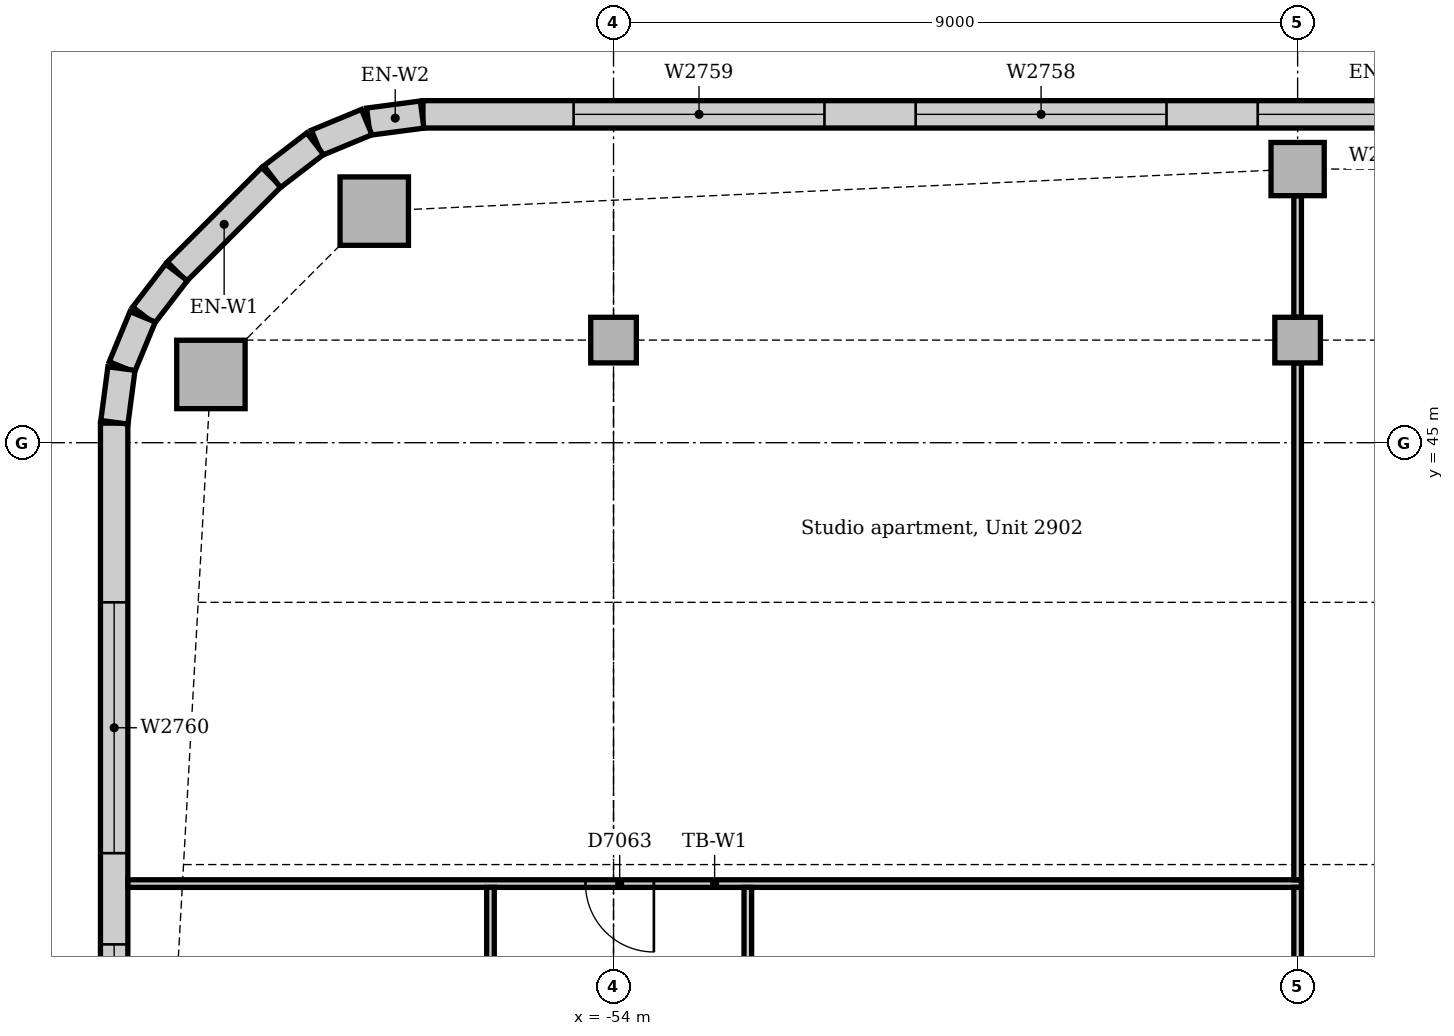
"""IFC4 building model, lengths in metres.
Left out: names, types, materials, properties, quantities, classifications, styles, units other than length and angle.
Written with IfcOpenShell. Run it as: python <this file> out.ifc"""

import sys

from ifc_helpers import new_model, si_unit, direction, frame, frame_2d, origin, origin_2d, place, context, subcontext, project, spatial, rectangle, extrude, element, fill, save


model = new_model("IFC4")
c1 = context("Model", 3, precision=1e-05, world=origin(), true_north=direction((0.0, 1.0)))
c2 = subcontext(c1, "Body", "Model", "MODEL_VIEW")
j1 = project(units=[si_unit("LENGTHUNIT", "METRE"), si_unit("PLANEANGLEUNIT", "RADIAN")], contexts=[c1])
p1 = place(None, origin())
s1 = spatial("IfcSite", under=j1, at=p1, CompositionType="ELEMENT")
p2 = place(p1, origin())
s2 = spatial("IfcBuilding", under=s1, at=p2, CompositionType="ELEMENT")
p3 = place(p2, frame((0.0, 0.0, 124.0)))
s3 = spatial("IfcBuildingStorey", under=s2, at=p3, CompositionType="ELEMENT", Elevation=124.0)
for number, where, z_axis, x_axis in (
    (1, (-57.148, 48.047, 0.0), (0.0, 0.0, 1.0), (1.0, 0.0, 0.0)),
    (2, (-59.297, 45.898, 0.0), (0.0, 0.0, 1.0), (1.0, 0.0, 0.0)),
):
    element("IfcColumn", number, at=place(p3, frame(where, z_axis=z_axis, x_axis=x_axis)), inside=s3, PredefinedType="COLUMN", context=c2, shape_type="SweptSolid", body=[
        extrude(rectangle(XDim=0.9, YDim=0.9, at=origin_2d()), origin(), (0.0, 0.0, 1.0), 3.85),
    ])
p4 = place(p3, frame((-45.0, 48.6, 0.0), z_axis=(0.0, 0.0, 1.0), x_axis=(1.0, 0.0, 0.0)))
e3 = element("IfcColumn", 3, at=p4, inside=s3, PredefinedType="COLUMN", context=c2, shape_type="SweptSolid", body=[
    extrude(rectangle(XDim=0.7, YDim=0.7, at=origin_2d()), origin(), (0.0, 0.0, 1.0), 3.85),
])
for number, where, z_axis, x_axis in (
    (4, (-54.0, 46.35, 0.0), (0.0, 0.0, 1.0), (1.0, 0.0, 0.0)),
    (5, (-45.0, 46.35, 0.0), (0.0, 0.0, 1.0), (1.0, 0.0, 0.0)),
):
    element("IfcColumn", number, at=place(p3, frame(where, z_axis=z_axis, x_axis=x_axis)), inside=s3, PredefinedType="COLUMN", context=c2, shape_type="SweptSolid", body=[
        extrude(rectangle(XDim=0.6, YDim=0.6, at=origin_2d()), origin(), (0.0, 0.0, 1.0), 3.85),
    ])
p5 = place(p3, frame((-31.243, 49.32, 0.0), z_axis=(0.0, 0.0, 1.0), x_axis=(-1.0, 0.0, 0.0)))
e6 = element("IfcWall", 6, at=p5, inside=s3, PredefinedType="STANDARD", context=c2, shape_type="SweptSolid", body=[
    extrude(rectangle(XDim=25.265, YDim=0.36, at=frame_2d((12.632, 0.0))), origin(), (0.0, 0.0, 1.0), 3.85),
])
p6 = place(p5, frame((1.982, 0.0, 0.9)))
e7 = element("IfcOpeningElement", 7, at=p6, cuts=e6, PredefinedType="OPENING", context=c2, shape_type="SweptSolid", body=[
    extrude(rectangle(XDim=3.3, YDim=1.6, at=frame_2d((1.65, 0.8))), frame((0.0, 0.19, 0.0), z_axis=(0.0, -1.0, 0.0), x_axis=(1.0, 0.0, 0.0)), (0.0, 0.0, 1.0), 0.38),
])
p7 = place(p5, frame((6.482, 0.0, 0.9)))
e8 = element("IfcOpeningElement", 8, at=p7, cuts=e6, PredefinedType="OPENING", context=c2, shape_type="SweptSolid", body=[
    extrude(rectangle(XDim=3.3, YDim=1.6, at=frame_2d((1.65, 0.8))), frame((0.0, 0.19, 0.0), z_axis=(0.0, -1.0, 0.0), x_axis=(1.0, 0.0, 0.0)), (0.0, 0.0, 1.0), 0.38),
])
p8 = place(p5, frame((10.982, 0.0, 0.9)))
e9 = element("IfcOpeningElement", 9, at=p8, cuts=e6, PredefinedType="OPENING", context=c2, shape_type="SweptSolid", body=[
    extrude(rectangle(XDim=3.3, YDim=1.6, at=frame_2d((1.65, 0.8))), frame((0.0, 0.19, 0.0), z_axis=(0.0, -1.0, 0.0), x_axis=(1.0, 0.0, 0.0)), (0.0, 0.0, 1.0), 0.38),
])
p9 = place(p5, frame((15.482, 0.0, 0.9)))
e10 = element("IfcOpeningElement", 10, at=p9, cuts=e6, PredefinedType="OPENING", context=c2, shape_type="SweptSolid", body=[
    extrude(rectangle(XDim=3.3, YDim=1.6, at=frame_2d((1.65, 0.8))), frame((0.0, 0.19, 0.0), z_axis=(0.0, -1.0, 0.0), x_axis=(1.0, 0.0, 0.0)), (0.0, 0.0, 1.0), 0.38),
])
p10 = place(p5, frame((19.982, 0.0, 0.9)))
e11 = element("IfcOpeningElement", 11, at=p10, cuts=e6, PredefinedType="OPENING", context=c2, shape_type="SweptSolid", body=[
    extrude(rectangle(XDim=3.3, YDim=1.6, at=frame_2d((1.65, 0.8))), frame((0.0, 0.19, 0.0), z_axis=(0.0, -1.0, 0.0), x_axis=(1.0, 0.0, 0.0)), (0.0, 0.0, 1.0), 0.38),
])
p11 = place(p3, frame((-58.501, 48.494, 0.0), z_axis=(0.0, 0.0, 1.0), x_axis=(-0.707106781187, -0.707106781187, 0.0)))
e12 = element("IfcWall", 12, at=p11, inside=s3, PredefinedType="STANDARD", context=c2, shape_type="SweptSolid", body=[
    extrude(rectangle(XDim=1.757, YDim=0.36, at=frame_2d((0.879, 0.0))), origin(), (0.0, 0.0, 1.0), 3.85),
])
p12 = place(p3, frame((-60.57, 45.257, 0.0), z_axis=(0.0, 0.0, 1.0), x_axis=(0.0, -1.0, 0.0)))
e13 = element("IfcWall", 13, at=p12, inside=s3, PredefinedType="STANDARD", context=c2, shape_type="SweptSolid", body=[
    extrude(rectangle(XDim=21.515, YDim=0.36, at=frame_2d((10.757, 0.0))), origin(), (0.0, 0.0, 1.0), 3.85),
])
p13 = place(p12, frame((2.357, 0.0, 0.9)))
e14 = element("IfcOpeningElement", 14, at=p13, cuts=e13, PredefinedType="OPENING", context=c2, shape_type="SweptSolid", body=[
    extrude(rectangle(XDim=3.3, YDim=1.6, at=frame_2d((1.65, 0.8))), frame((0.0, 0.19, 0.0), z_axis=(0.0, -1.0, 0.0), x_axis=(1.0, 0.0, 0.0)), (0.0, 0.0, 1.0), 0.38),
])
p14 = place(p12, frame((6.857, 0.0, 0.9)))
e15 = element("IfcOpeningElement", 15, at=p14, cuts=e13, PredefinedType="OPENING", context=c2, shape_type="SweptSolid", body=[
    extrude(rectangle(XDim=3.3, YDim=1.6, at=frame_2d((1.65, 0.8))), frame((0.0, 0.19, 0.0), z_axis=(0.0, -1.0, 0.0), x_axis=(1.0, 0.0, 0.0)), (0.0, 0.0, 1.0), 0.38),
])
p15 = place(p12, frame((11.357, 0.0, 0.9)))
e16 = element("IfcOpeningElement", 16, at=p15, cuts=e13, PredefinedType="OPENING", context=c2, shape_type="SweptSolid", body=[
    extrude(rectangle(XDim=3.3, YDim=1.6, at=frame_2d((1.65, 0.8))), frame((0.0, 0.19, 0.0), z_axis=(0.0, -1.0, 0.0), x_axis=(1.0, 0.0, 0.0)), (0.0, 0.0, 1.0), 0.38),
])
p16 = place(p12, frame((15.857, 0.0, 0.9)))
e17 = element("IfcOpeningElement", 17, at=p16, cuts=e13, PredefinedType="OPENING", context=c2, shape_type="SweptSolid", body=[
    extrude(rectangle(XDim=3.3, YDim=1.6, at=frame_2d((1.65, 0.8))), frame((0.0, 0.19, 0.0), z_axis=(0.0, -1.0, 0.0), x_axis=(1.0, 0.0, 0.0)), (0.0, 0.0, 1.0), 0.38),
])
for number, where, z_axis, x_axis in (
    (18, (-56.519, 49.317, 0.0), (0.0, 0.0, 1.0), (-0.991, -0.131, 0.0)),
    (19, (-57.247, 49.218, 0.0), (0.0, 0.0, 1.0), (-0.924, -0.383, 0.0)),
):
    element("IfcWall", number, at=place(p3, frame(where, z_axis=z_axis, x_axis=x_axis)), inside=s3, PredefinedType="STANDARD", context=c2, shape_type="SweptSolid", body=[
        extrude(rectangle(XDim=0.713, YDim=0.36, at=frame_2d((0.356, 0.0))), origin(), (0.0, 0.0, 1.0), 3.85),
    ])
for number, where, z_axis, x_axis in (
    (20, (-57.925, 48.934, 0.0), (0.0, 0.0, 1.0), (-0.793, -0.609, 0.0)),
    (21, (-59.75, 47.241, 0.0), (0.0, 0.0, 1.0), (-0.609, -0.793, 0.0)),
):
    element("IfcWall", number, at=place(p3, frame(where, z_axis=z_axis, x_axis=x_axis)), inside=s3, PredefinedType="STANDARD", context=c2, shape_type="SweptSolid", body=[
        extrude(rectangle(XDim=0.713, YDim=0.36, at=frame_2d((0.357, 0.0))), origin(), (0.0, 0.0, 1.0), 3.85),
    ])
for number, where, z_axis, x_axis in (
    (22, (-60.195, 46.656, 0.0), (0.0, 0.0, 1.0), (-0.383, -0.924, 0.0)),
    (23, (-60.474, 45.976, 0.0), (0.0, 0.0, 1.0), (-0.131, -0.991, 0.0)),
):
    element("IfcWall", number, at=place(p3, frame(where, z_axis=z_axis, x_axis=x_axis)), inside=s3, PredefinedType="STANDARD", context=c2, shape_type="SweptSolid", body=[
        extrude(rectangle(XDim=0.713, YDim=0.36, at=frame_2d((0.356, 0.0))), origin(), (0.0, 0.0, 1.0), 3.85),
    ])
p17 = place(p3, frame((-60.39, 39.2, 0.0), z_axis=(0.0, 0.0, 1.0), x_axis=(1.0, 0.0, 0.0)))
e24 = element("IfcWall", 24, at=p17, inside=s3, PredefinedType="PARTITIONING", context=c2, shape_type="SweptSolid", body=[
    extrude(rectangle(XDim=15.44, YDim=0.1, at=frame_2d((7.72, 0.0))), origin(), (0.0, 0.0, 1.0), 3.85),
])
p18 = place(p17, frame((6.021, 0.0, 0.0)))
e25 = element("IfcOpeningElement", 25, at=p18, cuts=e24, PredefinedType="OPENING", context=c2, shape_type="SweptSolid", body=[
    extrude(rectangle(XDim=0.9, YDim=2.1, at=frame_2d((0.45, 1.05))), frame((0.0, 0.06, 0.0), z_axis=(0.0, -1.0, 0.0), x_axis=(1.0, 0.0, 0.0)), (0.0, 0.0, 1.0), 0.12),
])
p19 = place(p3, frame((-45.0, 39.25, 0.0), z_axis=(0.0, 0.0, 1.0), x_axis=(0.0, 1.0, 0.0)))
e26 = element("IfcWall", 26, at=p19, inside=s3, PredefinedType="PARTITIONING", context=c2, shape_type="SweptSolid", body=[
    extrude(rectangle(XDim=6.8, YDim=0.1, at=frame_2d((3.4, 0.0))), origin(), (0.0, 0.0, 1.0), 3.362),
])
p20 = place(p3, frame((-45.0, 36.3, 0.0), z_axis=(0.0, 0.0, 1.0), x_axis=(0.0, 1.0, 0.0)))
e27 = element("IfcWall", 27, at=p20, inside=s3, PredefinedType="PARTITIONING", context=c2, shape_type="SweptSolid", body=[
    extrude(rectangle(XDim=2.85, YDim=0.1, at=frame_2d((1.425, 0.0))), origin(), (0.0, 0.0, 1.0), 3.362),
])
p21 = place(p3, frame((-45.0, 46.65, 0.0), z_axis=(0.0, 0.0, 1.0), x_axis=(0.0, 1.0, 0.0)))
e28 = element("IfcWall", 28, at=p21, inside=s3, PredefinedType="PARTITIONING", context=c2, shape_type="SweptSolid", body=[
    extrude(rectangle(XDim=1.6, YDim=0.1, at=frame_2d((0.8, 0.0))), origin(), (0.0, 0.0, 1.0), 3.652),
])
p22 = place(p3, frame((-55.619, 36.075, 0.0), z_axis=(0.0, 0.0, 1.0), x_axis=(0.0, 1.0, 0.0)))
e29 = element("IfcWall", 29, at=p22, inside=s3, PredefinedType="PARTITIONING", context=c2, shape_type="SweptSolid", body=[
    extrude(rectangle(XDim=3.075, YDim=0.1, at=frame_2d((1.538, 0.0))), origin(), (0.0, 0.0, 1.0), 3.85),
])
p23 = place(p22, frame((1.1, 0.0, 0.0)))
e30 = element("IfcOpeningElement", 30, at=p23, cuts=e29, PredefinedType="OPENING", context=c2, shape_type="SweptSolid", body=[
    extrude(rectangle(XDim=0.9, YDim=2.1, at=frame_2d((0.45, 1.05))), frame((0.0, 0.06, 0.0), z_axis=(0.0, -1.0, 0.0), x_axis=(1.0, 0.0, 0.0)), (0.0, 0.0, 1.0), 0.12),
])
p24 = place(p3, frame((-52.233, 36.075, 0.0), z_axis=(0.0, 0.0, 1.0), x_axis=(0.0, 1.0, 0.0)))
e31 = element("IfcWall", 31, at=p24, inside=s3, PredefinedType="PARTITIONING", context=c2, shape_type="SweptSolid", body=[
    extrude(rectangle(XDim=3.075, YDim=0.1, at=frame_2d((1.538, 0.0))), origin(), (0.0, 0.0, 1.0), 3.85),
])
p25 = place(p24, frame((1.1, 0.0, 0.0)))
e32 = element("IfcOpeningElement", 32, at=p25, cuts=e31, PredefinedType="OPENING", context=c2, shape_type="SweptSolid", body=[
    extrude(rectangle(XDim=0.9, YDim=2.1, at=frame_2d((0.45, 1.05))), frame((0.0, 0.06, 0.0), z_axis=(0.0, -1.0, 0.0), x_axis=(1.0, 0.0, 0.0)), (0.0, 0.0, 1.0), 0.12),
])
p26 = place(p8, origin())
e33 = element("IfcWindow", 33, at=p26, inside=s3, PartitioningType="SINGLE_PANEL", PredefinedType="WINDOW", context=c2, shape_type="SweptSolid", body=[
    extrude(rectangle(XDim=3.3, YDim=1.6, at=frame_2d((1.65, 0.8))), frame((0.0, 0.13, 0.0), z_axis=(0.0, -1.0, 0.0), x_axis=(1.0, 0.0, 0.0)), (0.0, 0.0, 1.0), 0.06),
])
fill(e9, e33)
p27 = place(p9, origin())
e34 = element("IfcWindow", 34, at=p27, inside=s3, PartitioningType="SINGLE_PANEL", PredefinedType="WINDOW", context=c2, shape_type="SweptSolid", body=[
    extrude(rectangle(XDim=3.3, YDim=1.6, at=frame_2d((1.65, 0.8))), frame((0.0, 0.13, 0.0), z_axis=(0.0, -1.0, 0.0), x_axis=(1.0, 0.0, 0.0)), (0.0, 0.0, 1.0), 0.06),
])
fill(e10, e34)
p28 = place(p10, origin())
e35 = element("IfcWindow", 35, at=p28, inside=s3, PartitioningType="SINGLE_PANEL", PredefinedType="WINDOW", context=c2, shape_type="SweptSolid", body=[
    extrude(rectangle(XDim=3.3, YDim=1.6, at=frame_2d((1.65, 0.8))), frame((0.0, 0.13, 0.0), z_axis=(0.0, -1.0, 0.0), x_axis=(1.0, 0.0, 0.0)), (0.0, 0.0, 1.0), 0.06),
])
fill(e11, e35)
p29 = place(p13, origin())
e36 = element("IfcWindow", 36, at=p29, inside=s3, PartitioningType="SINGLE_PANEL", PredefinedType="WINDOW", context=c2, shape_type="SweptSolid", body=[
    extrude(rectangle(XDim=3.3, YDim=1.6, at=frame_2d((1.65, 0.8))), frame((0.0, 0.13, 0.0), z_axis=(0.0, -1.0, 0.0), x_axis=(1.0, 0.0, 0.0)), (0.0, 0.0, 1.0), 0.06),
])
fill(e14, e36)
p30 = place(p14, origin())
e37 = element("IfcWindow", 37, at=p30, inside=s3, PartitioningType="SINGLE_PANEL", PredefinedType="WINDOW", context=c2, shape_type="SweptSolid", body=[
    extrude(rectangle(XDim=3.3, YDim=1.6, at=frame_2d((1.65, 0.8))), frame((0.0, 0.13, 0.0), z_axis=(0.0, -1.0, 0.0), x_axis=(1.0, 0.0, 0.0)), (0.0, 0.0, 1.0), 0.06),
])
fill(e15, e37)
p31 = place(p18, frame((0.9, 0.0, 0.0), z_axis=(0.0, 0.0, 1.0), x_axis=(-1.0, 0.0, 0.0)))
e38 = element("IfcDoor", 38, at=p31, inside=s3, OperationType="SINGLE_SWING_LEFT", PredefinedType="DOOR", context=c2, shape_type="SweptSolid", body=[
    extrude(rectangle(XDim=0.9, YDim=2.1, at=frame_2d((0.45, 1.05))), frame((0.0, 0.025, 0.0), z_axis=(0.0, -1.0, 0.0), x_axis=(1.0, 0.0, 0.0)), (0.0, 0.0, 1.0), 0.05),
])
fill(e25, e38)
save(model, sys.argv[1])
